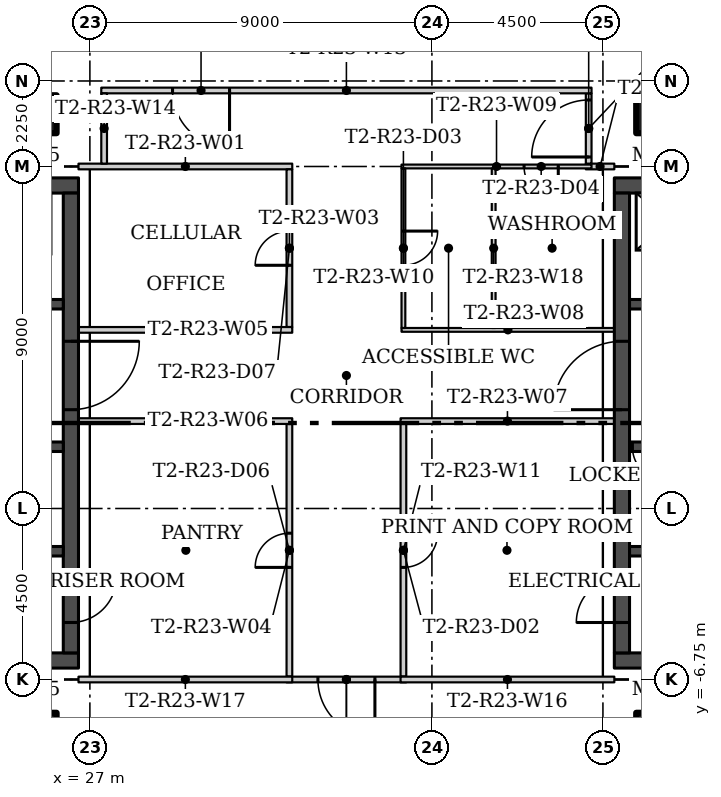
"""IFC4 building model, lengths in metres.
Left out: names, types, materials, properties, quantities, classifications, styles, units other than length and angle.
Written with IfcOpenShell. Run it as: python <this file> out.ifc"""

import sys

from ifc_helpers import new_model, si_unit, direction, frame, frame_2d, origin, origin_2d, place, context, subcontext, project, spatial, rectangle, hollow_rectangle, extrude, element, fill, save


model = new_model("IFC4")
c1 = context("Model", 3, precision=1e-05, world=origin(), true_north=direction((0.0, 1.0)))
c2 = subcontext(c1, "Body", "Model", "MODEL_VIEW")
j1 = project(units=[si_unit("LENGTHUNIT", "METRE"), si_unit("PLANEANGLEUNIT", "RADIAN")], contexts=[c1])
p1 = place(None, origin())
s1 = spatial("IfcSite", under=j1, at=p1, CompositionType="ELEMENT")
p2 = place(p1, origin())
s2 = spatial("IfcBuilding", under=s1, at=p2, CompositionType="ELEMENT")
p3 = place(p2, frame((0.0, 0.0, 210.0)))
s3 = spatial("IfcBuildingStorey", under=s2, at=p3, CompositionType="ELEMENT", Elevation=210.0)
for number, where in (
    (1, (25.625, 8.125, 0.0)),
    (2, (41.875, 8.125, 0.0)),
    (3, (25.625, -8.125, 0.0)),
    (4, (41.875, -8.125, 0.0)),
):
    element("IfcColumn", number, at=place(p3, frame(where)), inside=s3, PredefinedType="COLUMN", context=c2, shape_type="SweptSolid", body=[
        extrude(hollow_rectangle(XDim=1.0, YDim=1.0, WallThickness=0.04, at=origin_2d()), origin(), (0.0, 0.0, 1.0), 3.55),
    ])
p4 = place(p3, frame((32.325, 6.75, 0.0), z_axis=(0.0, 0.0, 1.0), x_axis=(-1.0, 0.0, 0.0)))
e5 = element("IfcWall", 5, at=p4, inside=s3, PredefinedType="PARTITIONING", context=c2, shape_type="SweptSolid", body=[
    extrude(rectangle(XDim=5.625, YDim=0.15, at=frame_2d((2.812, 0.0))), origin(), (0.0, 0.0, 1.0), 3.55),
])
p5 = place(p3, frame((40.8, 6.75, 0.0), z_axis=(0.0, 0.0, 1.0), x_axis=(-1.0, 0.0, 0.0)))
e6 = element("IfcWall", 6, at=p5, inside=s3, PredefinedType="PARTITIONING", context=c2, shape_type="SweptSolid", body=[
    extrude(rectangle(XDim=0.75, YDim=0.15, at=frame_2d((0.375, 0.0))), origin(), (0.0, 0.0, 1.0), 3.55),
])
p6 = place(p3, frame((32.25, 2.525, 0.0), z_axis=(0.0, 0.0, 1.0), x_axis=(0.0, 1.0, 0.0)))
e7 = element("IfcWall", 7, at=p6, inside=s3, PredefinedType="PARTITIONING", context=c2, shape_type="SweptSolid", body=[
    extrude(rectangle(XDim=4.15, YDim=0.15, at=frame_2d((2.075, 0.0))), origin(), (0.0, 0.0, 1.0), 3.55),
])
p7 = place(p6, frame((1.625, 0.0, 0.0)))
e8 = element("IfcOpeningElement", 8, at=p7, cuts=e7, PredefinedType="OPENING", context=c2, shape_type="SweptSolid", body=[
    extrude(rectangle(XDim=0.9, YDim=2.1, at=frame_2d((0.45, 1.05))), frame((0.0, 0.085, 0.0), z_axis=(0.0, -1.0, 0.0), x_axis=(1.0, 0.0, 0.0)), (0.0, 0.0, 1.0), 0.17),
])
p8 = place(p3, frame((32.25, -6.675, 0.0), z_axis=(0.0, 0.0, 1.0), x_axis=(0.0, 1.0, 0.0)))
e9 = element("IfcWall", 9, at=p8, inside=s3, PredefinedType="PARTITIONING", context=c2, shape_type="SweptSolid", body=[
    extrude(rectangle(XDim=6.65, YDim=0.15, at=frame_2d((3.325, 0.0))), origin(), (0.0, 0.0, 1.0), 3.55),
])
p9 = place(p8, frame((2.875, 0.0, 0.0)))
e10 = element("IfcOpeningElement", 10, at=p9, cuts=e9, PredefinedType="OPENING", context=c2, shape_type="SweptSolid", body=[
    extrude(rectangle(XDim=0.9, YDim=2.1, at=frame_2d((0.45, 1.05))), frame((0.0, 0.085, 0.0), z_axis=(0.0, -1.0, 0.0), x_axis=(1.0, 0.0, 0.0)), (0.0, 0.0, 1.0), 0.17),
])
p10 = place(p3, frame((26.7, 2.45, 0.0)))
e11 = element("IfcWall", 11, at=p10, inside=s3, PredefinedType="PARTITIONING", context=c2, shape_type="SweptSolid", body=[
    extrude(rectangle(XDim=5.625, YDim=0.15, at=frame_2d((2.812, 0.0))), origin(), (0.0, 0.0, 1.0), 3.55),
])
for number, where, z_axis, x_axis in (
    (12, (32.325, 0.05, 0.0), (0.0, 0.0, 1.0), (-1.0, 0.0, 0.0)),
    (13, (40.8, 0.05, 0.0), (0.0, 0.0, 1.0), (-1.0, 0.0, 0.0)),
):
    element("IfcWall", number, at=place(p3, frame(where, z_axis=z_axis, x_axis=x_axis)), inside=s3, PredefinedType="PARTITIONING", context=c2, shape_type="SweptSolid", body=[
        extrude(rectangle(XDim=5.625, YDim=0.15, at=frame_2d((2.812, 0.0))), origin(), (0.0, 0.0, 1.0), 3.55),
    ])
p11 = place(p3, frame((35.2, 2.45, 0.0)))
e14 = element("IfcWall", 14, at=p11, inside=s3, PredefinedType="PARTITIONING", context=c2, shape_type="SweptSolid", body=[
    extrude(rectangle(XDim=5.6, YDim=0.1, at=frame_2d((2.8, 0.0))), origin(), (0.0, 0.0, 1.0), 3.55),
])
p12 = place(p3, frame((40.2, 6.75, 0.0), z_axis=(0.0, 0.0, 1.0), x_axis=(-1.0, 0.0, 0.0)))
e15 = element("IfcWall", 15, at=p12, inside=s3, PredefinedType="PARTITIONING", context=c2, shape_type="SweptSolid", body=[
    extrude(rectangle(XDim=5.0, YDim=0.1, at=frame_2d((2.5, 0.0))), origin(), (0.0, 0.0, 1.0), 3.55),
])
p13 = place(p12, frame((0.875, 0.0, 0.0)))
e16 = element("IfcOpeningElement", 16, at=p13, cuts=e15, PredefinedType="OPENING", context=c2, shape_type="SweptSolid", body=[
    extrude(rectangle(XDim=0.9, YDim=2.1, at=frame_2d((0.45, 1.05))), frame((0.0, 0.06, 0.0), z_axis=(0.0, -1.0, 0.0), x_axis=(1.0, 0.0, 0.0)), (0.0, 0.0, 1.0), 0.12),
])
p14 = place(p3, frame((35.25, 6.7, 0.0), z_axis=(0.0, 0.0, 1.0), x_axis=(0.0, -1.0, 0.0)))
e17 = element("IfcWall", 17, at=p14, inside=s3, PredefinedType="PARTITIONING", context=c2, shape_type="SweptSolid", body=[
    extrude(rectangle(XDim=4.2, YDim=0.1, at=frame_2d((2.1, 0.0))), origin(), (0.0, 0.0, 1.0), 3.55),
])
p15 = place(p14, frame((1.65, 0.0, 0.0)))
e18 = element("IfcOpeningElement", 18, at=p15, cuts=e17, PredefinedType="OPENING", context=c2, shape_type="SweptSolid", body=[
    extrude(rectangle(XDim=0.9, YDim=2.1, at=frame_2d((0.45, 1.05))), frame((0.0, 0.06, 0.0), z_axis=(0.0, -1.0, 0.0), x_axis=(1.0, 0.0, 0.0)), (0.0, 0.0, 1.0), 0.12),
])
p16 = place(p3, frame((35.25, -0.025, 0.0), z_axis=(0.0, 0.0, 1.0), x_axis=(0.0, -1.0, 0.0)))
e19 = element("IfcWall", 19, at=p16, inside=s3, PredefinedType="PARTITIONING", context=c2, shape_type="SweptSolid", body=[
    extrude(rectangle(XDim=6.65, YDim=0.15, at=frame_2d((3.325, 0.0))), origin(), (0.0, 0.0, 1.0), 3.55),
])
p17 = place(p16, frame((2.875, 0.0, 0.0)))
e20 = element("IfcOpeningElement", 20, at=p17, cuts=e19, PredefinedType="OPENING", context=c2, shape_type="SweptSolid", body=[
    extrude(rectangle(XDim=0.9, YDim=2.1, at=frame_2d((0.45, 1.05))), frame((0.0, 0.085, 0.0), z_axis=(0.0, -1.0, 0.0), x_axis=(1.0, 0.0, 0.0)), (0.0, 0.0, 1.0), 0.17),
])
p18 = place(p3, frame((40.125, 6.825, 0.0), z_axis=(0.0, 0.0, 1.0), x_axis=(0.0, 1.0, 0.0)))
e21 = element("IfcWall", 21, at=p18, inside=s3, PredefinedType="PARTITIONING", context=c2, shape_type="SweptSolid", body=[
    extrude(rectangle(XDim=1.85, YDim=0.15, at=frame_2d((0.925, 0.0))), origin(), (0.0, 0.0, 1.0), 3.55),
])
p19 = place(p18, frame((0.175, 0.0, 0.0)))
e22 = element("IfcOpeningElement", 22, at=p19, cuts=e21, PredefinedType="OPENING", context=c2, shape_type="SweptSolid", body=[
    extrude(rectangle(XDim=1.5, YDim=2.1, at=frame_2d((0.75, 1.05))), frame((0.0, 0.085, 0.0), z_axis=(0.0, -1.0, 0.0), x_axis=(1.0, 0.0, 0.0)), (0.0, 0.0, 1.0), 0.17),
])
p20 = place(p3, frame((40.2, 8.75, 0.0), z_axis=(0.0, 0.0, 1.0), x_axis=(-1.0, 0.0, 0.0)))
e23 = element("IfcWall", 23, at=p20, inside=s3, PredefinedType="PARTITIONING", context=c2, shape_type="SweptSolid", body=[
    extrude(rectangle(XDim=12.9, YDim=0.15, at=frame_2d((6.45, 0.0))), origin(), (0.0, 0.0, 1.0), 3.55),
])
p21 = place(p20, frame((9.525, 0.0, 0.0)))
e24 = element("IfcOpeningElement", 24, at=p21, cuts=e23, PredefinedType="OPENING", context=c2, shape_type="SweptSolid", body=[
    extrude(rectangle(XDim=1.5, YDim=2.1, at=frame_2d((0.75, 1.05))), frame((0.0, 0.085, 0.0), z_axis=(0.0, -1.0, 0.0), x_axis=(1.0, 0.0, 0.0)), (0.0, 0.0, 1.0), 0.17),
])
p22 = place(p3, frame((27.375, 8.675, 0.0), z_axis=(0.0, 0.0, 1.0), x_axis=(0.0, -1.0, 0.0)))
e25 = element("IfcWall", 25, at=p22, inside=s3, PredefinedType="PARTITIONING", context=c2, shape_type="SweptSolid", body=[
    extrude(rectangle(XDim=1.85, YDim=0.15, at=frame_2d((0.925, 0.0))), origin(), (0.0, 0.0, 1.0), 3.55),
])
p23 = place(p3, frame((35.325, -6.75, 0.0), z_axis=(0.0, 0.0, 1.0), x_axis=(-1.0, 0.0, 0.0)))
e26 = element("IfcWall", 26, at=p23, inside=s3, PredefinedType="PARTITIONING", context=c2, shape_type="SweptSolid", body=[
    extrude(rectangle(XDim=3.15, YDim=0.15, at=frame_2d((1.575, 0.0))), origin(), (0.0, 0.0, 1.0), 3.55),
])
p24 = place(p23, frame((0.825, 0.0, 0.0)))
e27 = element("IfcOpeningElement", 27, at=p24, cuts=e26, PredefinedType="OPENING", context=c2, shape_type="SweptSolid", body=[
    extrude(rectangle(XDim=1.5, YDim=2.1, at=frame_2d((0.75, 1.05))), frame((0.0, 0.085, 0.0), z_axis=(0.0, -1.0, 0.0), x_axis=(1.0, 0.0, 0.0)), (0.0, 0.0, 1.0), 0.17),
])
for number, where in (
    (28, (35.175, -6.75, 0.0)),
    (29, (26.7, -6.75, 0.0)),
):
    element("IfcWall", number, at=place(p3, frame(where)), inside=s3, PredefinedType="PARTITIONING", context=c2, shape_type="SweptSolid", body=[
        extrude(rectangle(XDim=5.625, YDim=0.15, at=frame_2d((2.812, 0.0))), origin(), (0.0, 0.0, 1.0), 3.55),
    ])
p25 = place(p3, frame((37.625, 6.7, 0.0), z_axis=(0.0, 0.0, 1.0), x_axis=(0.0, -1.0, 0.0)))
e30 = element("IfcWall", 30, at=p25, inside=s3, PredefinedType="PARTITIONING", context=c2, shape_type="SweptSolid", body=[
    extrude(rectangle(XDim=4.2, YDim=0.1, at=frame_2d((2.1, 0.0))), origin(), (0.0, 0.0, 1.0), 3.55),
])
for number, where in (
    (31, (13.8, -6.25, 0.0)),
    (32, (13.8, 6.25, 0.0)),
):
    element("IfcWall", number, at=place(p3, frame(where)), inside=s3, PredefinedType="SHEAR", context=c2, shape_type="SweptSolid", body=[
        extrude(rectangle(XDim=12.9, YDim=0.4, at=frame_2d((6.45, 0.0))), origin(), (0.0, 0.0, 1.0), 3.55),
    ])
p26 = place(p3, frame((26.5, 6.05, 0.0), z_axis=(0.0, 0.0, 1.0), x_axis=(0.0, -1.0, 0.0)))
e33 = element("IfcWall", 33, at=p26, inside=s3, PredefinedType="SHEAR", context=c2, shape_type="SweptSolid", body=[
    extrude(rectangle(XDim=12.1, YDim=0.4, at=frame_2d((6.05, 0.0))), origin(), (0.0, 0.0, 1.0), 3.55),
])
p27 = place(p26, frame((10.1, 0.0, 0.0)))
e34 = element("IfcOpeningElement", 34, at=p27, cuts=e33, PredefinedType="OPENING", context=c2, shape_type="SweptSolid", body=[
    extrude(rectangle(XDim=1.2, YDim=2.1, at=frame_2d((0.6, 1.05))), frame((0.0, 0.21, 0.0), z_axis=(0.0, -1.0, 0.0), x_axis=(1.0, 0.0, 0.0)), (0.0, 0.0, 1.0), 0.42),
])
p28 = place(p26, frame((3.9, 0.0, 0.0)))
e35 = element("IfcOpeningElement", 35, at=p28, cuts=e33, PredefinedType="OPENING", context=c2, shape_type="SweptSolid", body=[
    extrude(rectangle(XDim=1.8, YDim=2.4, at=frame_2d((0.9, 1.2))), frame((0.0, 0.21, 0.0), z_axis=(0.0, -1.0, 0.0), x_axis=(1.0, 0.0, 0.0)), (0.0, 0.0, 1.0), 0.42),
])
p29 = place(p3, frame((26.3, -3.375, 0.0), z_axis=(0.0, 0.0, 1.0), x_axis=(-1.0, 0.0, 0.0)))
e36 = element("IfcWall", 36, at=p29, inside=s3, PredefinedType="SHEAR", context=c2, shape_type="SweptSolid", body=[
    extrude(rectangle(XDim=12.1, YDim=0.25, at=frame_2d((6.05, 0.0))), origin(), (0.0, 0.0, 1.0), 3.55),
])
p30 = place(p29, frame((10.95, 0.0, 0.0)))
e37 = element("IfcOpeningElement", 37, at=p30, cuts=e36, PredefinedType="OPENING", context=c2, shape_type="SweptSolid", body=[
    extrude(rectangle(XDim=1.1, YDim=2.1, at=frame_2d((0.55, 1.05))), frame((0.0, 0.135, 0.0), z_axis=(0.0, -1.0, 0.0), x_axis=(1.0, 0.0, 0.0)), (0.0, 0.0, 1.0), 0.27),
])
p31 = place(p3, frame((26.3, -0.625, 0.0), z_axis=(0.0, 0.0, 1.0), x_axis=(-1.0, 0.0, 0.0)))
e38 = element("IfcWall", 38, at=p31, inside=s3, PredefinedType="SHEAR", context=c2, shape_type="SweptSolid", body=[
    extrude(rectangle(XDim=12.1, YDim=0.25, at=frame_2d((6.05, 0.0))), origin(), (0.0, 0.0, 1.0), 3.55),
])
p32 = place(p31, frame((8.65, 0.0, 0.0)))
e39 = element("IfcOpeningElement", 39, at=p32, cuts=e38, PredefinedType="OPENING", context=c2, shape_type="SweptSolid", body=[
    extrude(rectangle(XDim=1.2, YDim=2.1, at=frame_2d((0.6, 1.05))), frame((0.0, 0.135, 0.0), z_axis=(0.0, -1.0, 0.0), x_axis=(1.0, 0.0, 0.0)), (0.0, 0.0, 1.0), 0.27),
])
p33 = place(p31, frame((1.175, 0.0, 0.0)))
e40 = element("IfcOpeningElement", 40, at=p33, cuts=e38, PredefinedType="OPENING", context=c2, shape_type="SweptSolid", body=[
    extrude(rectangle(XDim=0.9, YDim=2.1, at=frame_2d((0.45, 1.05))), frame((0.0, 0.135, 0.0), z_axis=(0.0, -1.0, 0.0), x_axis=(1.0, 0.0, 0.0)), (0.0, 0.0, 1.0), 0.27),
])
p34 = place(p3, frame((14.2, 3.125, 0.0)))
e41 = element("IfcWall", 41, at=p34, inside=s3, PredefinedType="SHEAR", context=c2, shape_type="SweptSolid", body=[
    extrude(rectangle(XDim=12.1, YDim=0.25, at=frame_2d((6.05, 0.0))), origin(), (0.0, 0.0, 1.0), 3.55),
])
p35 = place(p34, frame((6.95, 0.0, 0.0)))
e42 = element("IfcOpeningElement", 42, at=p35, cuts=e41, PredefinedType="OPENING", context=c2, shape_type="SweptSolid", body=[
    extrude(rectangle(XDim=1.1, YDim=2.1, at=frame_2d((0.55, 1.05))), frame((0.0, 0.135, 0.0), z_axis=(0.0, -1.0, 0.0), x_axis=(1.0, 0.0, 0.0)), (0.0, 0.0, 1.0), 0.27),
])
p36 = place(p34, frame((10.075, 0.0, 0.0)))
e43 = element("IfcOpeningElement", 43, at=p36, cuts=e41, PredefinedType="OPENING", context=c2, shape_type="SweptSolid", body=[
    extrude(rectangle(XDim=1.1, YDim=2.1, at=frame_2d((0.55, 1.05))), frame((0.0, 0.135, 0.0), z_axis=(0.0, -1.0, 0.0), x_axis=(1.0, 0.0, 0.0)), (0.0, 0.0, 1.0), 0.27),
])
p37 = place(p34, frame((2.475, 0.0, 0.0)))
e44 = element("IfcOpeningElement", 44, at=p37, cuts=e41, PredefinedType="OPENING", context=c2, shape_type="SweptSolid", body=[
    extrude(rectangle(XDim=0.9, YDim=2.1, at=frame_2d((0.45, 1.05))), frame((0.0, 0.135, 0.0), z_axis=(0.0, -1.0, 0.0), x_axis=(1.0, 0.0, 0.0)), (0.0, 0.0, 1.0), 0.27),
])
for number, where, z_axis, x_axis in (
    (45, (53.7, -6.25, 0.0), (0.0, 0.0, 1.0), (-1.0, 0.0, 0.0)),
    (46, (53.7, 6.25, 0.0), (0.0, 0.0, 1.0), (-1.0, 0.0, 0.0)),
):
    element("IfcWall", number, at=place(p3, frame(where, z_axis=z_axis, x_axis=x_axis)), inside=s3, PredefinedType="SHEAR", context=c2, shape_type="SweptSolid", body=[
        extrude(rectangle(XDim=12.9, YDim=0.4, at=frame_2d((6.45, 0.0))), origin(), (0.0, 0.0, 1.0), 3.55),
    ])
p38 = place(p3, frame((41.0, -6.05, 0.0), z_axis=(0.0, 0.0, 1.0), x_axis=(0.0, 1.0, 0.0)))
e47 = element("IfcWall", 47, at=p38, inside=s3, PredefinedType="SHEAR", context=c2, shape_type="SweptSolid", body=[
    extrude(rectangle(XDim=12.1, YDim=0.4, at=frame_2d((6.05, 0.0))), origin(), (0.0, 0.0, 1.0), 3.55),
])
p39 = place(p38, frame((0.8, 0.0, 0.0)))
e48 = element("IfcOpeningElement", 48, at=p39, cuts=e47, PredefinedType="OPENING", context=c2, shape_type="SweptSolid", body=[
    extrude(rectangle(XDim=1.2, YDim=2.1, at=frame_2d((0.6, 1.05))), frame((0.0, 0.21, 0.0), z_axis=(0.0, -1.0, 0.0), x_axis=(1.0, 0.0, 0.0)), (0.0, 0.0, 1.0), 0.42),
])
p40 = place(p38, frame((6.4, 0.0, 0.0)))
e49 = element("IfcOpeningElement", 49, at=p40, cuts=e47, PredefinedType="OPENING", context=c2, shape_type="SweptSolid", body=[
    extrude(rectangle(XDim=1.8, YDim=2.4, at=frame_2d((0.9, 1.2))), frame((0.0, 0.21, 0.0), z_axis=(0.0, -1.0, 0.0), x_axis=(1.0, 0.0, 0.0)), (0.0, 0.0, 1.0), 0.42),
])
p41 = place(p3, frame((53.3, -3.375, 0.0), z_axis=(0.0, 0.0, 1.0), x_axis=(-1.0, 0.0, 0.0)))
e50 = element("IfcWall", 50, at=p41, inside=s3, PredefinedType="SHEAR", context=c2, shape_type="SweptSolid", body=[
    extrude(rectangle(XDim=12.1, YDim=0.25, at=frame_2d((6.05, 0.0))), origin(), (0.0, 0.0, 1.0), 3.55),
])
p42 = place(p41, frame((0.05, 0.0, 0.0)))
e51 = element("IfcOpeningElement", 51, at=p42, cuts=e50, PredefinedType="OPENING", context=c2, shape_type="SweptSolid", body=[
    extrude(rectangle(XDim=1.1, YDim=2.1, at=frame_2d((0.55, 1.05))), frame((0.0, 0.135, 0.0), z_axis=(0.0, -1.0, 0.0), x_axis=(1.0, 0.0, 0.0)), (0.0, 0.0, 1.0), 0.27),
])
p43 = place(p3, frame((53.3, -0.625, 0.0), z_axis=(0.0, 0.0, 1.0), x_axis=(-1.0, 0.0, 0.0)))
e52 = element("IfcWall", 52, at=p43, inside=s3, PredefinedType="SHEAR", context=c2, shape_type="SweptSolid", body=[
    extrude(rectangle(XDim=12.1, YDim=0.25, at=frame_2d((6.05, 0.0))), origin(), (0.0, 0.0, 1.0), 3.55),
])
p44 = place(p43, frame((2.25, 0.0, 0.0)))
e53 = element("IfcOpeningElement", 53, at=p44, cuts=e52, PredefinedType="OPENING", context=c2, shape_type="SweptSolid", body=[
    extrude(rectangle(XDim=1.2, YDim=2.1, at=frame_2d((0.6, 1.05))), frame((0.0, 0.135, 0.0), z_axis=(0.0, -1.0, 0.0), x_axis=(1.0, 0.0, 0.0)), (0.0, 0.0, 1.0), 0.27),
])
p45 = place(p43, frame((9.5, 0.0, 0.0)))
e54 = element("IfcOpeningElement", 54, at=p45, cuts=e52, PredefinedType="OPENING", context=c2, shape_type="SweptSolid", body=[
    extrude(rectangle(XDim=0.9, YDim=2.1, at=frame_2d((0.45, 1.05))), frame((0.0, 0.135, 0.0), z_axis=(0.0, -1.0, 0.0), x_axis=(1.0, 0.0, 0.0)), (0.0, 0.0, 1.0), 0.27),
])
p46 = place(p43, frame((11.125, 0.0, 0.0)))
e55 = element("IfcOpeningElement", 55, at=p46, cuts=e52, PredefinedType="OPENING", context=c2, shape_type="SweptSolid", body=[
    extrude(rectangle(XDim=0.9, YDim=2.1, at=frame_2d((0.45, 1.05))), frame((0.0, 0.135, 0.0), z_axis=(0.0, -1.0, 0.0), x_axis=(1.0, 0.0, 0.0)), (0.0, 0.0, 1.0), 0.27),
])
p47 = place(p3, frame((41.2, 3.125, 0.0)))
e56 = element("IfcWall", 56, at=p47, inside=s3, PredefinedType="SHEAR", context=c2, shape_type="SweptSolid", body=[
    extrude(rectangle(XDim=4.8, YDim=0.25, at=frame_2d((2.4, 0.0))), origin(), (0.0, 0.0, 1.0), 3.55),
])
p48 = place(p47, frame((0.525, 0.0, 0.0)))
e57 = element("IfcOpeningElement", 57, at=p48, cuts=e56, PredefinedType="OPENING", context=c2, shape_type="SweptSolid", body=[
    extrude(rectangle(XDim=1.1, YDim=2.1, at=frame_2d((0.55, 1.05))), frame((0.0, 0.135, 0.0), z_axis=(0.0, -1.0, 0.0), x_axis=(1.0, 0.0, 0.0)), (0.0, 0.0, 1.0), 0.27),
])
p49 = place(p47, frame((3.025, 0.0, 0.0)))
e58 = element("IfcOpeningElement", 58, at=p49, cuts=e56, PredefinedType="OPENING", context=c2, shape_type="SweptSolid", body=[
    extrude(rectangle(XDim=0.9, YDim=2.1, at=frame_2d((0.45, 1.05))), frame((0.0, 0.135, 0.0), z_axis=(0.0, -1.0, 0.0), x_axis=(1.0, 0.0, 0.0)), (0.0, 0.0, 1.0), 0.27),
])
p50 = place(p19, origin())
e59 = element("IfcDoor", 59, at=p50, inside=s3, OperationType="DOUBLE_DOOR_SINGLE_SWING", PredefinedType="DOOR", context=c2, shape_type="SweptSolid", body=[
    extrude(rectangle(XDim=1.5, YDim=2.1, at=frame_2d((0.75, 1.05))), frame((0.0, 0.025, 0.0), z_axis=(0.0, -1.0, 0.0), x_axis=(1.0, 0.0, 0.0)), (0.0, 0.0, 1.0), 0.05),
])
fill(e22, e59)
p51 = place(p17, origin())
e60 = element("IfcDoor", 60, at=p51, inside=s3, OperationType="SINGLE_SWING_RIGHT", PredefinedType="DOOR", context=c2, shape_type="SweptSolid", body=[
    extrude(rectangle(XDim=0.9, YDim=2.1, at=frame_2d((0.45, 1.05))), frame((0.0, 0.025, 0.0), z_axis=(0.0, -1.0, 0.0), x_axis=(1.0, 0.0, 0.0)), (0.0, 0.0, 1.0), 0.05),
])
fill(e20, e60)
p52 = place(p15, origin())
e61 = element("IfcDoor", 61, at=p52, inside=s3, OperationType="SINGLE_SWING_RIGHT", PredefinedType="DOOR", context=c2, shape_type="SweptSolid", body=[
    extrude(rectangle(XDim=0.9, YDim=2.1, at=frame_2d((0.45, 1.05))), frame((0.0, 0.025, 0.0), z_axis=(0.0, -1.0, 0.0), x_axis=(1.0, 0.0, 0.0)), (0.0, 0.0, 1.0), 0.05),
])
fill(e18, e61)
p53 = place(p13, origin())
e62 = element("IfcDoor", 62, at=p53, inside=s3, OperationType="SINGLE_SWING_RIGHT", PredefinedType="DOOR", context=c2, shape_type="SweptSolid", body=[
    extrude(rectangle(XDim=0.9, YDim=2.1, at=frame_2d((0.45, 1.05))), frame((0.0, 0.025, 0.0), z_axis=(0.0, -1.0, 0.0), x_axis=(1.0, 0.0, 0.0)), (0.0, 0.0, 1.0), 0.05),
])
fill(e16, e62)
p54 = place(p24, origin())
e63 = element("IfcDoor", 63, at=p54, inside=s3, OperationType="DOUBLE_DOOR_SINGLE_SWING", PredefinedType="DOOR", context=c2, shape_type="SweptSolid", body=[
    extrude(rectangle(XDim=1.5, YDim=2.1, at=frame_2d((0.75, 1.05))), frame((0.0, 0.025, 0.0), z_axis=(0.0, -1.0, 0.0), x_axis=(1.0, 0.0, 0.0)), (0.0, 0.0, 1.0), 0.05),
])
fill(e27, e63)
p55 = place(p9, origin())
e64 = element("IfcDoor", 64, at=p55, inside=s3, OperationType="SINGLE_SWING_LEFT", PredefinedType="DOOR", context=c2, shape_type="SweptSolid", body=[
    extrude(rectangle(XDim=0.9, YDim=2.1, at=frame_2d((0.45, 1.05))), frame((0.0, 0.025, 0.0), z_axis=(0.0, -1.0, 0.0), x_axis=(1.0, 0.0, 0.0)), (0.0, 0.0, 1.0), 0.05),
])
fill(e10, e64)
p56 = place(p7, origin())
e65 = element("IfcDoor", 65, at=p56, inside=s3, OperationType="SINGLE_SWING_LEFT", PredefinedType="DOOR", context=c2, shape_type="SweptSolid", body=[
    extrude(rectangle(XDim=0.9, YDim=2.1, at=frame_2d((0.45, 1.05))), frame((0.0, 0.025, 0.0), z_axis=(0.0, -1.0, 0.0), x_axis=(1.0, 0.0, 0.0)), (0.0, 0.0, 1.0), 0.05),
])
fill(e8, e65)
p57 = place(p21, origin())
e66 = element("IfcDoor", 66, at=p57, inside=s3, OperationType="DOUBLE_DOOR_SINGLE_SWING", PredefinedType="DOOR", context=c2, shape_type="SweptSolid", body=[
    extrude(rectangle(XDim=1.5, YDim=2.1, at=frame_2d((0.75, 1.05))), frame((0.0, 0.025, 0.0), z_axis=(0.0, -1.0, 0.0), x_axis=(1.0, 0.0, 0.0)), (0.0, 0.0, 1.0), 0.05),
])
fill(e24, e66)
p58 = place(p27, origin())
e67 = element("IfcDoor", 67, at=p58, inside=s3, OperationType="SINGLE_SWING_RIGHT", PredefinedType="DOOR", context=c2, shape_type="SweptSolid", body=[
    extrude(rectangle(XDim=1.2, YDim=2.1, at=frame_2d((0.6, 1.05))), frame((0.0, 0.025, 0.0), z_axis=(0.0, -1.0, 0.0), x_axis=(1.0, 0.0, 0.0)), (0.0, 0.0, 1.0), 0.05),
])
fill(e34, e67)
p59 = place(p28, origin())
e68 = element("IfcDoor", 68, at=p59, inside=s3, OperationType="DOUBLE_DOOR_SINGLE_SWING", PredefinedType="DOOR", context=c2, shape_type="SweptSolid", body=[
    extrude(rectangle(XDim=1.8, YDim=2.4, at=frame_2d((0.9, 1.2))), frame((0.0, 0.025, 0.0), z_axis=(0.0, -1.0, 0.0), x_axis=(1.0, 0.0, 0.0)), (0.0, 0.0, 1.0), 0.05),
])
fill(e35, e68)
p60 = place(p39, origin())
e69 = element("IfcDoor", 69, at=p60, inside=s3, OperationType="SINGLE_SWING_LEFT", PredefinedType="DOOR", context=c2, shape_type="SweptSolid", body=[
    extrude(rectangle(XDim=1.2, YDim=2.1, at=frame_2d((0.6, 1.05))), frame((0.0, 0.025, 0.0), z_axis=(0.0, -1.0, 0.0), x_axis=(1.0, 0.0, 0.0)), (0.0, 0.0, 1.0), 0.05),
])
fill(e48, e69)
p61 = place(p40, origin())
e70 = element("IfcDoor", 70, at=p61, inside=s3, OperationType="DOUBLE_DOOR_SINGLE_SWING", PredefinedType="DOOR", context=c2, shape_type="SweptSolid", body=[
    extrude(rectangle(XDim=1.8, YDim=2.4, at=frame_2d((0.9, 1.2))), frame((0.0, 0.025, 0.0), z_axis=(0.0, -1.0, 0.0), x_axis=(1.0, 0.0, 0.0)), (0.0, 0.0, 1.0), 0.05),
])
fill(e49, e70)
p62 = place(p46, origin())
e71 = element("IfcDoor", 71, at=p62, inside=s3, OperationType="SINGLE_SWING_RIGHT", PredefinedType="DOOR", context=c2, shape_type="SweptSolid", body=[
    extrude(rectangle(XDim=0.9, YDim=2.1, at=frame_2d((0.45, 1.05))), frame((0.0, 0.025, 0.0), z_axis=(0.0, -1.0, 0.0), x_axis=(1.0, 0.0, 0.0)), (0.0, 0.0, 1.0), 0.05),
])
fill(e55, e71)
save(model, sys.argv[1])
